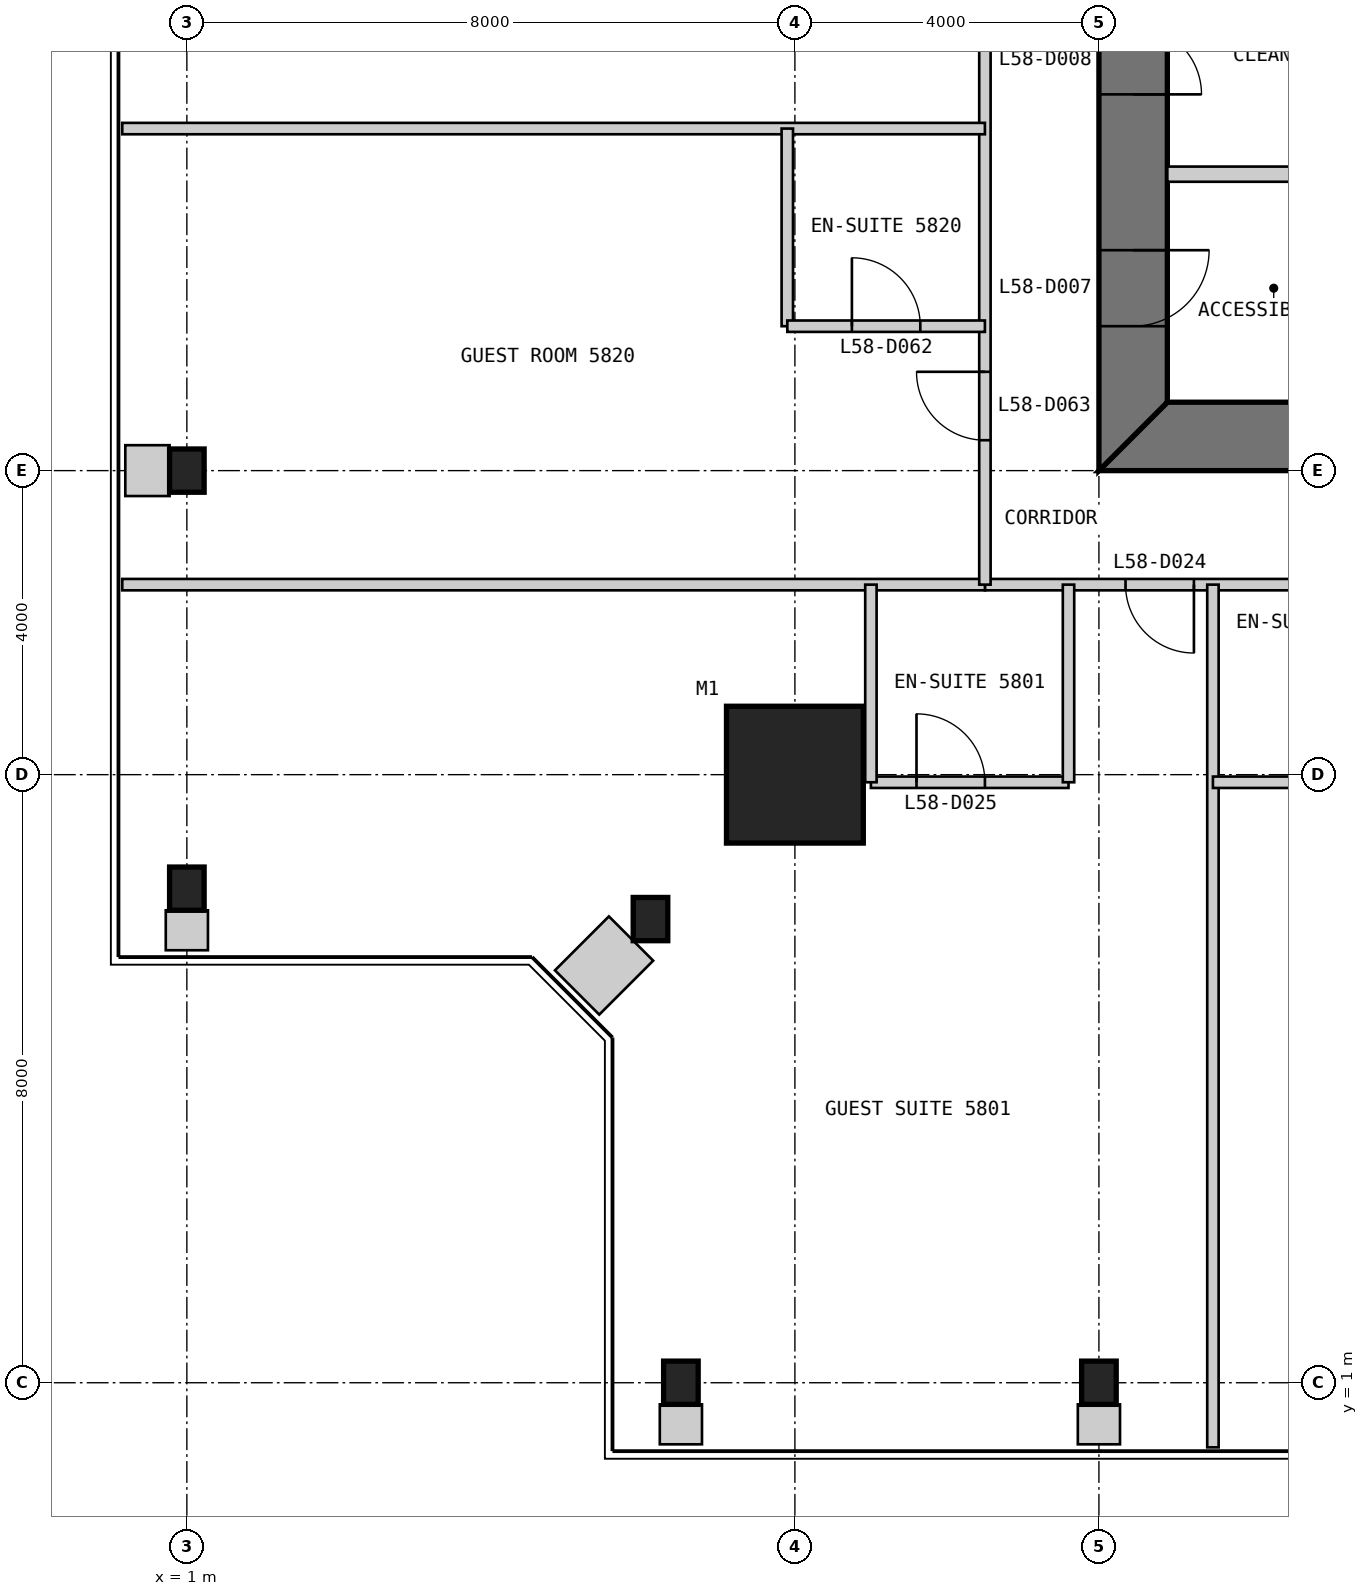
"""IFC4 building model, lengths in metres.
Left out: names, types, materials, properties, quantities, classifications, styles, units other than length and angle.
Written with IfcOpenShell. Run it as: python <this file> out.ifc"""

import sys

from ifc_helpers import new_model, si_unit, direction, frame, frame_2d, origin, origin_2d, place, context, subcontext, project, spatial, polyline, rectangle, i_section, outline, extrude, element, fill, save


model = new_model("IFC4")
c1 = context("Model", 3, precision=1e-05, world=origin(), true_north=direction((0.0, 1.0)))
c2 = subcontext(c1, "Body", "Model", "MODEL_VIEW")
j1 = project(units=[si_unit("LENGTHUNIT", "METRE"), si_unit("PLANEANGLEUNIT", "RADIAN")], contexts=[c1])
p1 = place(None, origin())
s1 = spatial("IfcSite", under=j1, at=p1, CompositionType="ELEMENT")
p2 = place(p1, origin())
s2 = spatial("IfcBuilding", under=s1, at=p2, CompositionType="ELEMENT")
p3 = place(p2, frame((0.0, 0.0, 249.2)))
s3 = spatial("IfcBuildingStorey", under=s2, at=p3, CompositionType="ELEMENT", Elevation=249.2)
p4 = place(p3, frame((9.0, 9.0, 0.0), z_axis=(0.0, 0.0, 1.0), x_axis=(1.0, 0.0, 0.0)))
e1 = element("IfcColumn", 1, at=p4, inside=s3, PredefinedType="COLUMN", context=c2, shape_type="SweptSolid", body=[
    extrude(rectangle(XDim=1.8, YDim=1.8, at=origin_2d()), origin(), (0.0, 0.0, 1.0), 3.4),
])
for number, where, z_axis, x_axis in (
    (2, (7.5, 1.0, 0.0), (0.0, 0.0, 1.0), (1.0, 0.0, 0.0)),
    (3, (13.0, 1.0, 0.0), (0.0, 0.0, 1.0), (1.0, 0.0, 0.0)),
    (4, (1.0, 13.0, 0.0), (0.0, 0.0, 1.0), (1.0, 0.0, 0.0)),
    (5, (1.0, 7.5, 0.0), (0.0, 0.0, 1.0), (1.0, 0.0, 0.0)),
    (6, (7.1, 7.1, 0.0), (0.0, 0.0, 1.0), (1.0, 0.0, 0.0)),
):
    element("IfcColumn", number, at=place(p3, frame(where, z_axis=z_axis, x_axis=x_axis)), inside=s3, PredefinedType="COLUMN", context=c2, shape_type="SweptSolid", body=[
        extrude(i_section(OverallWidth=0.455, OverallDepth=0.569, WebThickness=0.078, FlangeThickness=0.125, at=origin_2d()), origin(), (0.0, 0.0, 1.0), 3.4),
    ])
p5 = place(p3, frame((13.0, 13.45, 0.0), z_axis=(0.0, 0.0, 1.0), x_axis=(1.0, 0.0, 0.0)))
e7 = element("IfcWall", 7, at=p5, inside=s3, PredefinedType="SHEAR", context=c2, shape_type="SweptSolid", body=[
    extrude(outline(polyline([(0.0, -0.45), (24.0, -0.45), (23.1, 0.45), (0.9, 0.45), (0.0, -0.45)])), origin(), (0.0, 0.0, 1.0), 3.4),
])
p6 = place(p5, frame((4.9, 0.0, 0.0)))
e8 = element("IfcOpeningElement", 8, at=p6, cuts=e7, PredefinedType="OPENING", context=c2, shape_type="SweptSolid", body=[
    extrude(rectangle(XDim=1.0, YDim=2.2, at=frame_2d((0.5, 1.1))), frame((0.0, 0.46, 0.0), z_axis=(0.0, -1.0, 0.0), x_axis=(1.0, 0.0, 0.0)), (0.0, 0.0, 1.0), 0.92),
])
p7 = place(p5, frame((8.9, 0.0, 0.0)))
e9 = element("IfcOpeningElement", 9, at=p7, cuts=e7, PredefinedType="OPENING", context=c2, shape_type="SweptSolid", body=[
    extrude(rectangle(XDim=1.1, YDim=2.2, at=frame_2d((0.55, 1.1))), frame((0.0, 0.46, 0.0), z_axis=(0.0, -1.0, 0.0), x_axis=(1.0, 0.0, 0.0)), (0.0, 0.0, 1.0), 0.92),
])
p8 = place(p5, frame((15.05, 0.0, 0.0)))
e10 = element("IfcOpeningElement", 10, at=p8, cuts=e7, PredefinedType="OPENING", context=c2, shape_type="SweptSolid", body=[
    extrude(rectangle(XDim=0.9, YDim=2.2, at=frame_2d((0.45, 1.1))), frame((0.0, 0.46, 0.0), z_axis=(0.0, -1.0, 0.0), x_axis=(1.0, 0.0, 0.0)), (0.0, 0.0, 1.0), 0.92),
])
p9 = place(p5, frame((17.9, 0.0, 0.0)))
e11 = element("IfcOpeningElement", 11, at=p9, cuts=e7, PredefinedType="OPENING", context=c2, shape_type="SweptSolid", body=[
    extrude(rectangle(XDim=1.0, YDim=2.2, at=frame_2d((0.5, 1.1))), frame((0.0, 0.46, 0.0), z_axis=(0.0, -1.0, 0.0), x_axis=(1.0, 0.0, 0.0)), (0.0, 0.0, 1.0), 0.92),
])
p10 = place(p5, frame((21.4, 0.0, 0.0)))
e12 = element("IfcOpeningElement", 12, at=p10, cuts=e7, PredefinedType="OPENING", context=c2, shape_type="SweptSolid", body=[
    extrude(rectangle(XDim=1.0, YDim=2.2, at=frame_2d((0.5, 1.1))), frame((0.0, 0.46, 0.0), z_axis=(0.0, -1.0, 0.0), x_axis=(1.0, 0.0, 0.0)), (0.0, 0.0, 1.0), 0.92),
])
p11 = place(p3, frame((13.45, 36.1, 0.0), z_axis=(0.0, 0.0, 1.0), x_axis=(0.0, -1.0, 0.0)))
e13 = element("IfcWall", 13, at=p11, inside=s3, PredefinedType="SHEAR", context=c2, shape_type="SweptSolid", body=[
    extrude(outline(polyline([(-0.9, -0.45), (23.1, -0.45), (22.2, 0.45), (0.0, 0.45), (-0.9, -0.45)])), origin(), (0.0, 0.0, 1.0), 3.4),
])
p12 = place(p11, frame((20.2, 0.0, 0.0)))
e14 = element("IfcOpeningElement", 14, at=p12, cuts=e13, PredefinedType="OPENING", context=c2, shape_type="SweptSolid", body=[
    extrude(rectangle(XDim=1.0, YDim=2.2, at=frame_2d((0.5, 1.1))), frame((0.0, 0.46, 0.0), z_axis=(0.0, -1.0, 0.0), x_axis=(1.0, 0.0, 0.0)), (0.0, 0.0, 1.0), 0.92),
])
p13 = place(p11, frame((17.25, 0.0, 0.0)))
e15 = element("IfcOpeningElement", 15, at=p13, cuts=e13, PredefinedType="OPENING", context=c2, shape_type="SweptSolid", body=[
    extrude(rectangle(XDim=0.9, YDim=2.2, at=frame_2d((0.45, 1.1))), frame((0.0, 0.46, 0.0), z_axis=(0.0, -1.0, 0.0), x_axis=(1.0, 0.0, 0.0)), (0.0, 0.0, 1.0), 0.92),
])
p14 = place(p3, frame((13.9, 16.9, 0.0), z_axis=(0.0, 0.0, 1.0), x_axis=(1.0, 0.0, 0.0)))
e16 = element("IfcWall", 16, at=p14, inside=s3, PredefinedType="PARTITIONING", context=c2, shape_type="SweptSolid", body=[
    extrude(rectangle(XDim=2.8, YDim=0.2, at=frame_2d((1.4, 0.0))), origin(), (0.0, 0.0, 1.0), 3.2),
])
p15 = place(p3, frame((11.5, 11.5, 0.0), z_axis=(0.0, 0.0, 1.0), x_axis=(1.0, 0.0, 0.0)))
e17 = element("IfcWall", 17, at=p15, inside=s3, PredefinedType="PARTITIONING", context=c2, shape_type="SweptSolid", body=[
    extrude(rectangle(XDim=27.0, YDim=0.15, at=frame_2d((13.5, 0.0))), origin(), (0.0, 0.0, 1.0), 3.25),
])
p16 = place(p15, frame((1.85, 0.0, 0.0)))
e18 = element("IfcOpeningElement", 18, at=p16, cuts=e17, PredefinedType="OPENING", context=c2, shape_type="SweptSolid", body=[
    extrude(rectangle(XDim=0.9, YDim=2.1, at=frame_2d((0.45, 1.05))), frame((0.0, 0.085, 0.0), z_axis=(0.0, -1.0, 0.0), x_axis=(1.0, 0.0, 0.0)), (0.0, 0.0, 1.0), 0.17),
])
p17 = place(p15, frame((6.2, 0.0, 0.0)))
e19 = element("IfcOpeningElement", 19, at=p17, cuts=e17, PredefinedType="OPENING", context=c2, shape_type="SweptSolid", body=[
    extrude(rectangle(XDim=0.9, YDim=2.1, at=frame_2d((0.45, 1.05))), frame((0.0, 0.085, 0.0), z_axis=(0.0, -1.0, 0.0), x_axis=(1.0, 0.0, 0.0)), (0.0, 0.0, 1.0), 0.17),
])
p18 = place(p15, frame((12.2, 0.0, 0.0)))
e20 = element("IfcOpeningElement", 20, at=p18, cuts=e17, PredefinedType="OPENING", context=c2, shape_type="SweptSolid", body=[
    extrude(rectangle(XDim=0.9, YDim=2.1, at=frame_2d((0.45, 1.05))), frame((0.0, 0.085, 0.0), z_axis=(0.0, -1.0, 0.0), x_axis=(1.0, 0.0, 0.0)), (0.0, 0.0, 1.0), 0.17),
])
p19 = place(p15, frame((18.8, 0.0, 0.0)))
e21 = element("IfcOpeningElement", 21, at=p19, cuts=e17, PredefinedType="OPENING", context=c2, shape_type="SweptSolid", body=[
    extrude(rectangle(XDim=1.0, YDim=2.1, at=frame_2d((0.5, 1.05))), frame((0.0, 0.085, 0.0), z_axis=(0.0, -1.0, 0.0), x_axis=(1.0, 0.0, 0.0)), (0.0, 0.0, 1.0), 0.17),
])
p20 = place(p15, frame((24.2, 0.0, 0.0)))
e22 = element("IfcOpeningElement", 22, at=p20, cuts=e17, PredefinedType="OPENING", context=c2, shape_type="SweptSolid", body=[
    extrude(rectangle(XDim=0.9, YDim=2.1, at=frame_2d((0.45, 1.05))), frame((0.0, 0.085, 0.0), z_axis=(0.0, -1.0, 0.0), x_axis=(1.0, 0.0, 0.0)), (0.0, 0.0, 1.0), 0.17),
])
p21 = place(p3, frame((0.15, 11.5, 0.0), z_axis=(0.0, 0.0, 1.0), x_axis=(1.0, 0.0, 0.0)))
e23 = element("IfcWall", 23, at=p21, inside=s3, PredefinedType="PARTITIONING", context=c2, shape_type="SweptSolid", body=[
    extrude(rectangle(XDim=11.35, YDim=0.15, at=frame_2d((5.675, 0.0))), origin(), (0.0, 0.0, 1.0), 3.25),
])
p22 = place(p3, frame((10.0, 8.9, 0.0), z_axis=(0.0, 0.0, 1.0), x_axis=(1.0, 0.0, 0.0)))
e24 = element("IfcWall", 24, at=p22, inside=s3, PredefinedType="PARTITIONING", context=c2, shape_type="SweptSolid", body=[
    extrude(rectangle(XDim=2.6, YDim=0.15, at=frame_2d((1.3, 0.0))), origin(), (0.0, 0.0, 1.0), 2.638),
])
p23 = place(p22, frame((0.6, 0.0, 0.0)))
e25 = element("IfcOpeningElement", 25, at=p23, cuts=e24, PredefinedType="OPENING", context=c2, shape_type="SweptSolid", body=[
    extrude(rectangle(XDim=0.9, YDim=2.1, at=frame_2d((0.45, 1.05))), frame((0.0, 0.085, 0.0), z_axis=(0.0, -1.0, 0.0), x_axis=(1.0, 0.0, 0.0)), (0.0, 0.0, 1.0), 0.17),
])
for number, where, z_axis, x_axis in (
    (26, (10.0, 8.9, 0.0), (0.0, 0.0, 1.0), (0.0, 1.0, 0.0)),
    (27, (12.6, 8.9, 0.0), (0.0, 0.0, 1.0), (0.0, 1.0, 0.0)),
):
    element("IfcWall", number, at=place(p3, frame(where, z_axis=z_axis, x_axis=x_axis)), inside=s3, PredefinedType="PARTITIONING", context=c2, shape_type="SweptSolid", body=[
        extrude(rectangle(XDim=2.6, YDim=0.15, at=frame_2d((1.3, 0.0))), origin(), (0.0, 0.0, 1.0), 3.25),
    ])
p24 = place(p3, frame((14.5, 0.15, 0.0), z_axis=(0.0, 0.0, 1.0), x_axis=(0.0, 1.0, 0.0)))
e28 = element("IfcWall", 28, at=p24, inside=s3, PredefinedType="PARTITIONING", context=c2, shape_type="SweptSolid", body=[
    extrude(rectangle(XDim=11.35, YDim=0.15, at=frame_2d((5.675, 0.0))), origin(), (0.0, 0.0, 1.0), 3.25),
])
p25 = place(p3, frame((14.5, 8.9, 0.0), z_axis=(0.0, 0.0, 1.0), x_axis=(1.0, 0.0, 0.0)))
e29 = element("IfcWall", 29, at=p25, inside=s3, PredefinedType="PARTITIONING", context=c2, shape_type="SweptSolid", body=[
    extrude(rectangle(XDim=2.6, YDim=0.15, at=frame_2d((1.3, 0.0))), origin(), (0.0, 0.0, 1.0), 3.25),
])
p26 = place(p3, frame((11.5, 38.5, 0.0), z_axis=(0.0, 0.0, 1.0), x_axis=(0.0, -1.0, 0.0)))
e30 = element("IfcWall", 30, at=p26, inside=s3, PredefinedType="PARTITIONING", context=c2, shape_type="SweptSolid", body=[
    extrude(rectangle(XDim=27.0, YDim=0.15, at=frame_2d((13.5, 0.0))), origin(), (0.0, 0.0, 1.0), 3.25),
])
p27 = place(p26, frame((1.85, 0.0, 0.0)))
e31 = element("IfcOpeningElement", 31, at=p27, cuts=e30, PredefinedType="OPENING", context=c2, shape_type="SweptSolid", body=[
    extrude(rectangle(XDim=0.9, YDim=2.1, at=frame_2d((0.45, 1.05))), frame((0.0, 0.085, 0.0), z_axis=(0.0, -1.0, 0.0), x_axis=(1.0, 0.0, 0.0)), (0.0, 0.0, 1.0), 0.17),
])
p28 = place(p26, frame((6.2, 0.0, 0.0)))
e32 = element("IfcOpeningElement", 32, at=p28, cuts=e30, PredefinedType="OPENING", context=c2, shape_type="SweptSolid", body=[
    extrude(rectangle(XDim=0.9, YDim=2.1, at=frame_2d((0.45, 1.05))), frame((0.0, 0.085, 0.0), z_axis=(0.0, -1.0, 0.0), x_axis=(1.0, 0.0, 0.0)), (0.0, 0.0, 1.0), 0.17),
])
p29 = place(p26, frame((12.2, 0.0, 0.0)))
e33 = element("IfcOpeningElement", 33, at=p29, cuts=e30, PredefinedType="OPENING", context=c2, shape_type="SweptSolid", body=[
    extrude(rectangle(XDim=0.9, YDim=2.1, at=frame_2d((0.45, 1.05))), frame((0.0, 0.085, 0.0), z_axis=(0.0, -1.0, 0.0), x_axis=(1.0, 0.0, 0.0)), (0.0, 0.0, 1.0), 0.17),
])
p30 = place(p26, frame((18.2, 0.0, 0.0)))
e34 = element("IfcOpeningElement", 34, at=p30, cuts=e30, PredefinedType="OPENING", context=c2, shape_type="SweptSolid", body=[
    extrude(rectangle(XDim=0.9, YDim=2.1, at=frame_2d((0.45, 1.05))), frame((0.0, 0.085, 0.0), z_axis=(0.0, -1.0, 0.0), x_axis=(1.0, 0.0, 0.0)), (0.0, 0.0, 1.0), 0.17),
])
p31 = place(p26, frame((24.2, 0.0, 0.0)))
e35 = element("IfcOpeningElement", 35, at=p31, cuts=e30, PredefinedType="OPENING", context=c2, shape_type="SweptSolid", body=[
    extrude(rectangle(XDim=0.9, YDim=2.1, at=frame_2d((0.45, 1.05))), frame((0.0, 0.085, 0.0), z_axis=(0.0, -1.0, 0.0), x_axis=(1.0, 0.0, 0.0)), (0.0, 0.0, 1.0), 0.17),
])
p32 = place(p3, frame((0.15, 17.5, 0.0), z_axis=(0.0, 0.0, 1.0), x_axis=(1.0, 0.0, 0.0)))
e36 = element("IfcWall", 36, at=p32, inside=s3, PredefinedType="PARTITIONING", context=c2, shape_type="SweptSolid", body=[
    extrude(rectangle(XDim=11.35, YDim=0.15, at=frame_2d((5.675, 0.0))), origin(), (0.0, 0.0, 1.0), 3.25),
])
p33 = place(p3, frame((8.9, 17.5, 0.0), z_axis=(0.0, 0.0, 1.0), x_axis=(0.0, -1.0, 0.0)))
e37 = element("IfcWall", 37, at=p33, inside=s3, PredefinedType="PARTITIONING", context=c2, shape_type="SweptSolid", body=[
    extrude(rectangle(XDim=2.6, YDim=0.15, at=frame_2d((1.3, 0.0))), origin(), (0.0, 0.0, 1.0), 3.25),
])
p34 = place(p3, frame((8.9, 14.9, 0.0), z_axis=(0.0, 0.0, 1.0), x_axis=(1.0, 0.0, 0.0)))
e38 = element("IfcWall", 38, at=p34, inside=s3, PredefinedType="PARTITIONING", context=c2, shape_type="SweptSolid", body=[
    extrude(rectangle(XDim=2.6, YDim=0.15, at=frame_2d((1.3, 0.0))), origin(), (0.0, 0.0, 1.0), 3.25),
])
p35 = place(p34, frame((0.85, 0.0, 0.0)))
e39 = element("IfcOpeningElement", 39, at=p35, cuts=e38, PredefinedType="OPENING", context=c2, shape_type="SweptSolid", body=[
    extrude(rectangle(XDim=0.9, YDim=2.1, at=frame_2d((0.45, 1.05))), frame((0.0, 0.085, 0.0), z_axis=(0.0, -1.0, 0.0), x_axis=(1.0, 0.0, 0.0)), (0.0, 0.0, 1.0), 0.17),
])
for number, where, z_axis, x_axis in (
    (40, (7.5, 0.19, 0.0), (0.0, 0.0, 1.0), (0.0, 1.0, 0.0)),
    (41, (13.0, 0.19, 0.0), (0.0, 0.0, 1.0), (0.0, 1.0, 0.0)),
    (42, (1.0, 6.69, 0.0), (0.0, 0.0, 1.0), (0.0, 1.0, 0.0)),
):
    element("IfcWall", number, at=place(p3, frame(where, z_axis=z_axis, x_axis=x_axis)), inside=s3, PredefinedType="PARTITIONING", context=c2, shape_type="SweptSolid", body=[
        extrude(rectangle(XDim=0.526, YDim=0.555, at=frame_2d((0.263, 0.0))), origin(), (0.0, 0.0, 1.0), 3.25),
    ])
p36 = place(p3, frame((6.134, 6.134, 0.0), z_axis=(0.0, 0.0, 1.0), x_axis=(0.707106781187, 0.707106781187, 0.0)))
e43 = element("IfcWall", 43, at=p36, inside=s3, PredefinedType="PARTITIONING", context=c2, shape_type="SweptSolid", body=[
    extrude(rectangle(XDim=1.004, YDim=0.824, at=frame_2d((0.502, 0.0))), origin(), (0.0, 0.0, 1.0), 3.25),
])
p37 = place(p3, frame((0.19, 13.0, 0.0), z_axis=(0.0, 0.0, 1.0), x_axis=(1.0, 0.0, 0.0)))
e44 = element("IfcWall", 44, at=p37, inside=s3, PredefinedType="PARTITIONING", context=c2, shape_type="SweptSolid", body=[
    extrude(rectangle(XDim=0.583, YDim=0.669, at=frame_2d((0.292, 0.0))), origin(), (0.0, 0.0, 1.0), 3.25),
])
p38 = place(p12, origin())
e45 = element("IfcDoor", 45, at=p38, inside=s3, OperationType="SINGLE_SWING_LEFT", PredefinedType="DOOR", context=c2, shape_type="SweptSolid", body=[
    extrude(rectangle(XDim=1.0, YDim=2.2, at=frame_2d((0.5, 1.1))), frame((0.0, 0.025, 0.0), z_axis=(0.0, -1.0, 0.0), x_axis=(1.0, 0.0, 0.0)), (0.0, 0.0, 1.0), 0.05),
    extrude(outline(polyline([(0.0, 0.0), (0.04, 0.0), (0.04, 2.16), (0.96, 2.16), (0.96, 0.0), (1.0, 0.0), (1.0, 2.2), (0.0, 2.2), (0.0, 0.0)])), frame((0.0, 0.3, 0.0), z_axis=(0.0, -1.0, 0.0), x_axis=(1.0, 0.0, 0.0)), (0.0, 0.0, 1.0), 0.6),
])
fill(e14, e45)
p39 = place(p13, origin())
e46 = element("IfcDoor", 46, at=p39, inside=s3, OperationType="SINGLE_SWING_RIGHT", PredefinedType="DOOR", context=c2, shape_type="SweptSolid", body=[
    extrude(rectangle(XDim=0.9, YDim=2.2, at=frame_2d((0.45, 1.1))), frame((0.0, 0.025, 0.0), z_axis=(0.0, -1.0, 0.0), x_axis=(1.0, 0.0, 0.0)), (0.0, 0.0, 1.0), 0.05),
    extrude(outline(polyline([(0.0, 0.0), (0.04, 0.0), (0.04, 2.16), (0.86, 2.16), (0.86, 0.0), (0.9, 0.0), (0.9, 2.2), (0.0, 2.2), (0.0, 0.0)])), frame((0.0, 0.3, 0.0), z_axis=(0.0, -1.0, 0.0), x_axis=(1.0, 0.0, 0.0)), (0.0, 0.0, 1.0), 0.6),
])
fill(e15, e46)
p40 = place(p16, frame((0.9, 0.0, 0.0), z_axis=(0.0, 0.0, 1.0), x_axis=(-1.0, 0.0, 0.0)))
e47 = element("IfcDoor", 47, at=p40, inside=s3, OperationType="SINGLE_SWING_LEFT", PredefinedType="DOOR", context=c2, shape_type="SweptSolid", body=[
    extrude(rectangle(XDim=0.9, YDim=2.1, at=frame_2d((0.45, 1.05))), frame((0.0, 0.025, 0.0), z_axis=(0.0, -1.0, 0.0), x_axis=(1.0, 0.0, 0.0)), (0.0, 0.0, 1.0), 0.05),
])
fill(e18, e47)
p41 = place(p23, origin())
e48 = element("IfcDoor", 48, at=p41, inside=s3, OperationType="SINGLE_SWING_LEFT", PredefinedType="DOOR", context=c2, shape_type="SweptSolid", body=[
    extrude(rectangle(XDim=0.9, YDim=2.1, at=frame_2d((0.45, 1.05))), frame((0.0, 0.025, 0.0), z_axis=(0.0, -1.0, 0.0), x_axis=(1.0, 0.0, 0.0)), (0.0, 0.0, 1.0), 0.05),
])
fill(e25, e48)
p42 = place(p35, origin())
e49 = element("IfcDoor", 49, at=p42, inside=s3, OperationType="SINGLE_SWING_LEFT", PredefinedType="DOOR", context=c2, shape_type="SweptSolid", body=[
    extrude(rectangle(XDim=0.9, YDim=2.1, at=frame_2d((0.45, 1.05))), frame((0.0, 0.025, 0.0), z_axis=(0.0, -1.0, 0.0), x_axis=(1.0, 0.0, 0.0)), (0.0, 0.0, 1.0), 0.05),
])
fill(e39, e49)
p43 = place(p31, frame((0.9, 0.0, 0.0), z_axis=(0.0, 0.0, 1.0), x_axis=(-1.0, 0.0, 0.0)))
e50 = element("IfcDoor", 50, at=p43, inside=s3, OperationType="SINGLE_SWING_RIGHT", PredefinedType="DOOR", context=c2, shape_type="SweptSolid", body=[
    extrude(rectangle(XDim=0.9, YDim=2.1, at=frame_2d((0.45, 1.05))), frame((0.0, 0.025, 0.0), z_axis=(0.0, -1.0, 0.0), x_axis=(1.0, 0.0, 0.0)), (0.0, 0.0, 1.0), 0.05),
])
fill(e35, e50)
save(model, sys.argv[1])
